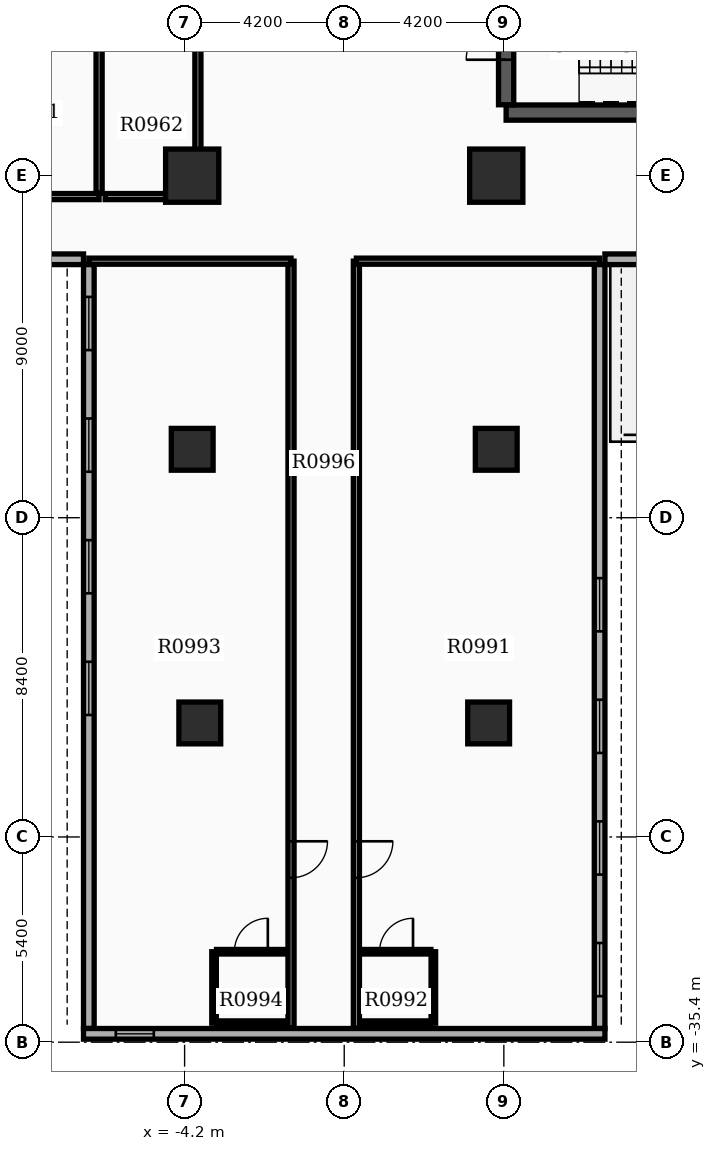
"""IFC4 building model, lengths in metres.
Left out: names, types, materials, properties, quantities, classifications, styles, units other than length and angle.
Written with IfcOpenShell. Run it as: python <this file> out.ifc"""

import sys

from ifc_helpers import new_model, si_unit, direction, frame, frame_2d, origin, origin_2d, place, context, subcontext, project, spatial, rectangle, extrude, element, fill, save


model = new_model("IFC4")
c1 = context("Model", 3, precision=1e-05, world=origin(), true_north=direction((0.0, 1.0)))
c2 = subcontext(c1, "Body", "Model", "MODEL_VIEW")
j1 = project(units=[si_unit("LENGTHUNIT", "METRE"), si_unit("PLANEANGLEUNIT", "RADIAN")], contexts=[c1])
p1 = place(None, origin())
s1 = spatial("IfcSite", under=j1, at=p1, CompositionType="ELEMENT")
p2 = place(p1, origin())
s2 = spatial("IfcBuilding", under=s1, at=p2, CompositionType="ELEMENT")
p3 = place(p2, frame((0.0, 0.0, 63.9)))
s3 = spatial("IfcBuildingStorey", under=s2, at=p3, CompositionType="ELEMENT", Elevation=63.9)
p4 = place(p3, frame((4.26, -10.94, 0.0), z_axis=(0.0, 0.0, 1.0), x_axis=(1.0, 0.0, 0.0)))
e1 = element("IfcWall", 1, at=p4, inside=s3, PredefinedType="SHEAR", context=c2, shape_type="SweptSolid", body=[
    extrude(rectangle(XDim=7.96, YDim=0.4, at=frame_2d((3.98, 0.0))), origin(), (0.0, 0.0, 1.0), 3.7),
])
p5 = place(p3, frame((4.26, -10.735, 0.0), z_axis=(0.0, 0.0, 1.0), x_axis=(0.0, 1.0, 0.0)))
e2 = element("IfcWall", 2, at=p5, inside=s3, PredefinedType="SHEAR", context=c2, shape_type="SweptSolid", body=[
    extrude(rectangle(XDim=3.43, YDim=0.4, at=frame_2d((1.715, 0.0))), origin(), (0.0, 0.0, 1.0), 3.7),
])
p6 = place(p5, frame((1.185, 0.0, 0.0)))
e3 = element("IfcOpeningElement", 3, at=p6, cuts=e2, PredefinedType="OPENING", context=c2, shape_type="SweptSolid", body=[
    extrude(rectangle(XDim=1.05, YDim=2.15, at=frame_2d((0.525, 1.075))), frame((0.0, 0.21, 0.0), z_axis=(0.0, -1.0, 0.0), x_axis=(1.0, 0.0, 0.0)), (0.0, 0.0, 1.0), 0.42),
])
for number, where, z_axis, x_axis in (
    (4, (-4.0, -12.6, 0.0), (0.0, 0.0, 1.0), (1.0, 0.0, 0.0)),
    (5, (4.0, -12.6, 0.0), (0.0, 0.0, 1.0), (1.0, 0.0, 0.0)),
):
    element("IfcColumn", number, at=place(p3, frame(where, z_axis=z_axis, x_axis=x_axis)), inside=s3, PredefinedType="COLUMN", context=c2, shape_type="SweptSolid", body=[
        extrude(rectangle(XDim=1.4, YDim=1.4, at=origin_2d()), origin(), (0.0, 0.0, 1.0), 3.9),
    ])
for number, where, z_axis, x_axis in (
    (6, (-4.0, -19.8, 0.0), (0.0, 0.0, 1.0), (1.0, 0.0, 0.0)),
    (7, (4.0, -19.8, 0.0), (0.0, 0.0, 1.0), (1.0, 0.0, 0.0)),
    (8, (-3.8, -27.0, 0.0), (0.0, 0.0, 1.0), (1.0, 0.0, 0.0)),
    (9, (3.8, -27.0, 0.0), (0.0, 0.0, 1.0), (1.0, 0.0, 0.0)),
):
    element("IfcColumn", number, at=place(p3, frame(where, z_axis=z_axis, x_axis=x_axis)), inside=s3, PredefinedType="COLUMN", context=c2, shape_type="SweptSolid", body=[
        extrude(rectangle(XDim=1.1, YDim=1.1, at=origin_2d()), origin(), (0.0, 0.0, 1.0), 3.9),
    ])
p7 = place(p3, frame((-6.72, -14.94, 0.0), z_axis=(0.0, 0.0, 1.0), x_axis=(0.0, -1.0, 0.0)))
e10 = element("IfcWall", 10, at=p7, inside=s3, PredefinedType="STANDARD", context=c2, shape_type="SweptSolid", body=[
    extrude(rectangle(XDim=20.1, YDim=0.28, at=frame_2d((10.05, 0.0))), origin(), (0.0, 0.0, 1.0), 2.91),
])
p8 = place(p7, frame((0.85, 0.0, 0.8)))
e11 = element("IfcOpeningElement", 11, at=p8, cuts=e10, PredefinedType="OPENING", context=c2, shape_type="SweptSolid", body=[
    extrude(rectangle(XDim=1.4, YDim=1.6, at=frame_2d((0.7, 0.8))), frame((0.0, 0.15, 0.0), z_axis=(0.0, -1.0, 0.0), x_axis=(1.0, 0.0, 0.0)), (0.0, 0.0, 1.0), 0.3),
])
p9 = place(p7, frame((4.05, 0.0, 0.8)))
e12 = element("IfcOpeningElement", 12, at=p9, cuts=e10, PredefinedType="OPENING", context=c2, shape_type="SweptSolid", body=[
    extrude(rectangle(XDim=1.4, YDim=1.6, at=frame_2d((0.7, 0.8))), frame((0.0, 0.15, 0.0), z_axis=(0.0, -1.0, 0.0), x_axis=(1.0, 0.0, 0.0)), (0.0, 0.0, 1.0), 0.3),
])
p10 = place(p7, frame((7.25, 0.0, 0.8)))
e13 = element("IfcOpeningElement", 13, at=p10, cuts=e10, PredefinedType="OPENING", context=c2, shape_type="SweptSolid", body=[
    extrude(rectangle(XDim=1.4, YDim=1.6, at=frame_2d((0.7, 0.8))), frame((0.0, 0.15, 0.0), z_axis=(0.0, -1.0, 0.0), x_axis=(1.0, 0.0, 0.0)), (0.0, 0.0, 1.0), 0.3),
])
p11 = place(p7, frame((10.45, 0.0, 0.8)))
e14 = element("IfcOpeningElement", 14, at=p11, cuts=e10, PredefinedType="OPENING", context=c2, shape_type="SweptSolid", body=[
    extrude(rectangle(XDim=1.4, YDim=1.6, at=frame_2d((0.7, 0.8))), frame((0.0, 0.15, 0.0), z_axis=(0.0, -1.0, 0.0), x_axis=(1.0, 0.0, 0.0)), (0.0, 0.0, 1.0), 0.3),
])
p12 = place(p3, frame((6.72, -35.04, 0.0), z_axis=(0.0, 0.0, 1.0), x_axis=(0.0, 1.0, 0.0)))
e15 = element("IfcWall", 15, at=p12, inside=s3, PredefinedType="STANDARD", context=c2, shape_type="SweptSolid", body=[
    extrude(rectangle(XDim=20.1, YDim=0.28, at=frame_2d((10.05, 0.0))), origin(), (0.0, 0.0, 1.0), 2.91),
])
p13 = place(p12, frame((0.85, 0.0, 0.8)))
e16 = element("IfcOpeningElement", 16, at=p13, cuts=e15, PredefinedType="OPENING", context=c2, shape_type="SweptSolid", body=[
    extrude(rectangle(XDim=1.4, YDim=1.6, at=frame_2d((0.7, 0.8))), frame((0.0, 0.15, 0.0), z_axis=(0.0, -1.0, 0.0), x_axis=(1.0, 0.0, 0.0)), (0.0, 0.0, 1.0), 0.3),
])
p14 = place(p12, frame((4.05, 0.0, 0.8)))
e17 = element("IfcOpeningElement", 17, at=p14, cuts=e15, PredefinedType="OPENING", context=c2, shape_type="SweptSolid", body=[
    extrude(rectangle(XDim=1.4, YDim=1.6, at=frame_2d((0.7, 0.8))), frame((0.0, 0.15, 0.0), z_axis=(0.0, -1.0, 0.0), x_axis=(1.0, 0.0, 0.0)), (0.0, 0.0, 1.0), 0.3),
])
p15 = place(p12, frame((7.25, 0.0, 0.8)))
e18 = element("IfcOpeningElement", 18, at=p15, cuts=e15, PredefinedType="OPENING", context=c2, shape_type="SweptSolid", body=[
    extrude(rectangle(XDim=1.4, YDim=1.6, at=frame_2d((0.7, 0.8))), frame((0.0, 0.15, 0.0), z_axis=(0.0, -1.0, 0.0), x_axis=(1.0, 0.0, 0.0)), (0.0, 0.0, 1.0), 0.3),
])
p16 = place(p12, frame((10.45, 0.0, 0.8)))
e19 = element("IfcOpeningElement", 19, at=p16, cuts=e15, PredefinedType="OPENING", context=c2, shape_type="SweptSolid", body=[
    extrude(rectangle(XDim=1.4, YDim=1.6, at=frame_2d((0.7, 0.8))), frame((0.0, 0.15, 0.0), z_axis=(0.0, -1.0, 0.0), x_axis=(1.0, 0.0, 0.0)), (0.0, 0.0, 1.0), 0.3),
])
p17 = place(p3, frame((-6.86, -35.18, 0.0), z_axis=(0.0, 0.0, 1.0), x_axis=(1.0, 0.0, 0.0)))
e20 = element("IfcWall", 20, at=p17, inside=s3, PredefinedType="STANDARD", context=c2, shape_type="SweptSolid", body=[
    extrude(rectangle(XDim=13.72, YDim=0.28, at=frame_2d((6.86, 0.0))), origin(), (0.0, 0.0, 1.0), 2.91),
])
p18 = place(p17, frame((0.85, 0.0, 0.85)))
e21 = element("IfcOpeningElement", 21, at=p18, cuts=e20, PredefinedType="OPENING", context=c2, shape_type="SweptSolid", body=[
    extrude(rectangle(XDim=1.0, YDim=1.5, at=frame_2d((0.5, 0.75))), frame((0.0, 0.15, 0.0), z_axis=(0.0, -1.0, 0.0), x_axis=(1.0, 0.0, 0.0)), (0.0, 0.0, 1.0), 0.3),
])
for number, where, z_axis, x_axis in (
    (22, (-13.16, -14.8, 0.0), (0.0, 0.0, 1.0), (1.0, 0.0, 0.0)),
    (23, (13.16, -14.8, 0.0), (0.0, 0.0, 1.0), (-1.0, 0.0, 0.0)),
):
    element("IfcWall", number, at=place(p3, frame(where, z_axis=z_axis, x_axis=x_axis)), inside=s3, PredefinedType="STANDARD", context=c2, shape_type="SweptSolid", body=[
        extrude(rectangle(XDim=6.3, YDim=0.28, at=frame_2d((3.15, 0.0))), origin(), (0.0, 0.0, 1.0), 2.91),
    ])
p19 = place(p3, frame((-12.4, -13.15, 0.0), z_axis=(0.0, 0.0, 1.0), x_axis=(1.0, 0.0, 0.0)))
e24 = element("IfcWall", 24, at=p19, inside=s3, PredefinedType="PARTITIONING", context=c2, shape_type="SweptSolid", body=[
    extrude(rectangle(XDim=5.95, YDim=0.16, at=frame_2d((2.975, 0.0))), origin(), (0.0, 0.0, 1.0), 2.9),
])
p20 = place(p3, frame((-6.45, -13.065, 0.0), z_axis=(0.0, 0.0, 1.0), x_axis=(0.0, 1.0, 0.0)))
e25 = element("IfcWall", 25, at=p20, inside=s3, PredefinedType="PARTITIONING", context=c2, shape_type="SweptSolid", body=[
    extrude(rectangle(XDim=4.23, YDim=0.16, at=frame_2d((2.115, 0.0))), origin(), (0.0, 0.0, 1.0), 2.9),
])
p21 = place(p3, frame((-6.29, -13.15, 0.0), z_axis=(0.0, 0.0, 1.0), x_axis=(1.0, 0.0, 0.0)))
e26 = element("IfcWall", 26, at=p21, inside=s3, PredefinedType="PARTITIONING", context=c2, shape_type="SweptSolid", body=[
    extrude(rectangle(XDim=2.44, YDim=0.16, at=frame_2d((1.22, 0.0))), origin(), (0.0, 0.0, 1.0), 2.9),
])
p22 = place(p3, frame((-3.85, -13.065, 0.0), z_axis=(0.0, 0.0, 1.0), x_axis=(0.0, 1.0, 0.0)))
e27 = element("IfcWall", 27, at=p22, inside=s3, PredefinedType="PARTITIONING", context=c2, shape_type="SweptSolid", body=[
    extrude(rectangle(XDim=4.23, YDim=0.16, at=frame_2d((2.115, 0.0))), origin(), (0.0, 0.0, 1.0), 2.9),
])
p23 = place(p3, frame((0.32, -14.85, 0.0), z_axis=(0.0, 0.0, 1.0), x_axis=(0.0, -1.0, 0.0)))
e28 = element("IfcWall", 28, at=p23, inside=s3, PredefinedType="PARTITIONING", context=c2, shape_type="SweptSolid", body=[
    extrude(rectangle(XDim=20.182, YDim=0.16, at=frame_2d((10.091, 0.0))), origin(), (0.0, 0.0, 1.0), 2.9),
])
p24 = place(p23, frame((15.264, 0.0, 0.0)))
e29 = element("IfcOpeningElement", 29, at=p24, cuts=e28, PredefinedType="OPENING", context=c2, shape_type="SweptSolid", body=[
    extrude(rectangle(XDim=0.96, YDim=2.15, at=frame_2d((0.48, 1.075))), frame((0.0, 0.09, 0.0), z_axis=(0.0, -1.0, 0.0), x_axis=(1.0, 0.0, 0.0)), (0.0, 0.0, 1.0), 0.18),
])
p25 = place(p3, frame((0.32, -14.85, 0.0), z_axis=(0.0, 0.0, 1.0), x_axis=(1.0, 0.0, 0.0)))
e30 = element("IfcWall", 30, at=p25, inside=s3, PredefinedType="PARTITIONING", context=c2, shape_type="SweptSolid", body=[
    extrude(rectangle(XDim=6.4, YDim=0.16, at=frame_2d((3.2, 0.0))), origin(), (0.0, 0.0, 1.0), 2.9),
])
p26 = place(p3, frame((0.46, -33.02, 0.0), z_axis=(0.0, 0.0, 1.0), x_axis=(1.0, 0.0, 0.0)))
e31 = element("IfcWall", 31, at=p26, inside=s3, PredefinedType="PARTITIONING", context=c2, shape_type="SweptSolid", body=[
    extrude(rectangle(XDim=1.82, YDim=0.12, at=frame_2d((0.91, 0.0))), origin(), (0.0, 0.0, 1.0), 2.9),
])
p27 = place(p26, frame((0.47, 0.0, 0.0)))
e32 = element("IfcOpeningElement", 32, at=p27, cuts=e31, PredefinedType="OPENING", context=c2, shape_type="SweptSolid", body=[
    extrude(rectangle(XDim=0.88, YDim=2.1, at=frame_2d((0.44, 1.05))), frame((0.0, 0.07, 0.0), z_axis=(0.0, -1.0, 0.0), x_axis=(1.0, 0.0, 0.0)), (0.0, 0.0, 1.0), 0.14),
])
p28 = place(p3, frame((0.46, -34.9, 0.0), z_axis=(0.0, 0.0, 1.0), x_axis=(1.0, 0.0, 0.0)))
e33 = element("IfcWall", 33, at=p28, inside=s3, PredefinedType="PARTITIONING", context=c2, shape_type="SweptSolid", body=[
    extrude(rectangle(XDim=1.82, YDim=0.12, at=frame_2d((0.91, 0.0))), origin(), (0.0, 0.0, 1.0), 2.9),
])
p29 = place(p3, frame((2.345, -33.02, 0.0), z_axis=(0.0, 0.0, 1.0), x_axis=(0.0, -1.0, 0.0)))
e34 = element("IfcWall", 34, at=p29, inside=s3, PredefinedType="PARTITIONING", context=c2, shape_type="SweptSolid", body=[
    extrude(rectangle(XDim=1.88, YDim=0.12, at=frame_2d((0.94, 0.0))), origin(), (0.0, 0.0, 1.0), 2.9),
])
p30 = place(p3, frame((-1.4, -14.85, 0.0), z_axis=(0.0, 0.0, 1.0), x_axis=(0.0, -1.0, 0.0)))
e35 = element("IfcWall", 35, at=p30, inside=s3, PredefinedType="PARTITIONING", context=c2, shape_type="SweptSolid", body=[
    extrude(rectangle(XDim=20.182, YDim=0.16, at=frame_2d((10.091, 0.0))), origin(), (0.0, 0.0, 1.0), 2.9),
])
p31 = place(p30, frame((15.264, 0.0, 0.0)))
e36 = element("IfcOpeningElement", 36, at=p31, cuts=e35, PredefinedType="OPENING", context=c2, shape_type="SweptSolid", body=[
    extrude(rectangle(XDim=0.96, YDim=2.15, at=frame_2d((0.48, 1.075))), frame((0.0, 0.09, 0.0), z_axis=(0.0, -1.0, 0.0), x_axis=(1.0, 0.0, 0.0)), (0.0, 0.0, 1.0), 0.18),
])
p32 = place(p3, frame((-1.4, -14.85, 0.0), z_axis=(0.0, 0.0, 1.0), x_axis=(-1.0, 0.0, 0.0)))
e37 = element("IfcWall", 37, at=p32, inside=s3, PredefinedType="PARTITIONING", context=c2, shape_type="SweptSolid", body=[
    extrude(rectangle(XDim=5.32, YDim=0.16, at=frame_2d((2.66, 0.0))), origin(), (0.0, 0.0, 1.0), 2.9),
])
p33 = place(p3, frame((-3.36, -33.02, 0.0), z_axis=(0.0, 0.0, 1.0), x_axis=(1.0, 0.0, 0.0)))
e38 = element("IfcWall", 38, at=p33, inside=s3, PredefinedType="PARTITIONING", context=c2, shape_type="SweptSolid", body=[
    extrude(rectangle(XDim=1.82, YDim=0.12, at=frame_2d((0.91, 0.0))), origin(), (0.0, 0.0, 1.0), 2.9),
])
p34 = place(p33, frame((0.47, 0.0, 0.0)))
e39 = element("IfcOpeningElement", 39, at=p34, cuts=e38, PredefinedType="OPENING", context=c2, shape_type="SweptSolid", body=[
    extrude(rectangle(XDim=0.88, YDim=2.1, at=frame_2d((0.44, 1.05))), frame((0.0, 0.07, 0.0), z_axis=(0.0, -1.0, 0.0), x_axis=(1.0, 0.0, 0.0)), (0.0, 0.0, 1.0), 0.14),
])
p35 = place(p3, frame((-3.36, -34.9, 0.0), z_axis=(0.0, 0.0, 1.0), x_axis=(1.0, 0.0, 0.0)))
e40 = element("IfcWall", 40, at=p35, inside=s3, PredefinedType="PARTITIONING", context=c2, shape_type="SweptSolid", body=[
    extrude(rectangle(XDim=1.82, YDim=0.12, at=frame_2d((0.91, 0.0))), origin(), (0.0, 0.0, 1.0), 2.9),
])
p36 = place(p3, frame((-3.425, -33.02, 0.0), z_axis=(0.0, 0.0, 1.0), x_axis=(0.0, -1.0, 0.0)))
e41 = element("IfcWall", 41, at=p36, inside=s3, PredefinedType="PARTITIONING", context=c2, shape_type="SweptSolid", body=[
    extrude(rectangle(XDim=1.88, YDim=0.12, at=frame_2d((0.94, 0.0))), origin(), (0.0, 0.0, 1.0), 2.9),
])
p37 = place(p8, origin())
e42 = element("IfcWindow", 42, at=p37, inside=s3, PartitioningType="SINGLE_PANEL", PredefinedType="WINDOW", context=c2, shape_type="SweptSolid", body=[
    extrude(rectangle(XDim=1.4, YDim=1.6, at=frame_2d((0.7, 0.8))), frame((0.0, 0.03, 0.0), z_axis=(0.0, -1.0, 0.0), x_axis=(1.0, 0.0, 0.0)), (0.0, 0.0, 1.0), 0.06),
])
fill(e11, e42)
p38 = place(p9, origin())
e43 = element("IfcWindow", 43, at=p38, inside=s3, PartitioningType="SINGLE_PANEL", PredefinedType="WINDOW", context=c2, shape_type="SweptSolid", body=[
    extrude(rectangle(XDim=1.4, YDim=1.6, at=frame_2d((0.7, 0.8))), frame((0.0, 0.03, 0.0), z_axis=(0.0, -1.0, 0.0), x_axis=(1.0, 0.0, 0.0)), (0.0, 0.0, 1.0), 0.06),
])
fill(e12, e43)
p39 = place(p10, origin())
e44 = element("IfcWindow", 44, at=p39, inside=s3, PartitioningType="SINGLE_PANEL", PredefinedType="WINDOW", context=c2, shape_type="SweptSolid", body=[
    extrude(rectangle(XDim=1.4, YDim=1.6, at=frame_2d((0.7, 0.8))), frame((0.0, 0.03, 0.0), z_axis=(0.0, -1.0, 0.0), x_axis=(1.0, 0.0, 0.0)), (0.0, 0.0, 1.0), 0.06),
])
fill(e13, e44)
p40 = place(p11, origin())
e45 = element("IfcWindow", 45, at=p40, inside=s3, PartitioningType="SINGLE_PANEL", PredefinedType="WINDOW", context=c2, shape_type="SweptSolid", body=[
    extrude(rectangle(XDim=1.4, YDim=1.6, at=frame_2d((0.7, 0.8))), frame((0.0, 0.03, 0.0), z_axis=(0.0, -1.0, 0.0), x_axis=(1.0, 0.0, 0.0)), (0.0, 0.0, 1.0), 0.06),
])
fill(e14, e45)
p41 = place(p13, origin())
e46 = element("IfcWindow", 46, at=p41, inside=s3, PartitioningType="SINGLE_PANEL", PredefinedType="WINDOW", context=c2, shape_type="SweptSolid", body=[
    extrude(rectangle(XDim=1.4, YDim=1.6, at=frame_2d((0.7, 0.8))), frame((0.0, 0.03, 0.0), z_axis=(0.0, -1.0, 0.0), x_axis=(1.0, 0.0, 0.0)), (0.0, 0.0, 1.0), 0.06),
])
fill(e16, e46)
p42 = place(p14, origin())
e47 = element("IfcWindow", 47, at=p42, inside=s3, PartitioningType="SINGLE_PANEL", PredefinedType="WINDOW", context=c2, shape_type="SweptSolid", body=[
    extrude(rectangle(XDim=1.4, YDim=1.6, at=frame_2d((0.7, 0.8))), frame((0.0, 0.03, 0.0), z_axis=(0.0, -1.0, 0.0), x_axis=(1.0, 0.0, 0.0)), (0.0, 0.0, 1.0), 0.06),
])
fill(e17, e47)
p43 = place(p15, origin())
e48 = element("IfcWindow", 48, at=p43, inside=s3, PartitioningType="SINGLE_PANEL", PredefinedType="WINDOW", context=c2, shape_type="SweptSolid", body=[
    extrude(rectangle(XDim=1.4, YDim=1.6, at=frame_2d((0.7, 0.8))), frame((0.0, 0.03, 0.0), z_axis=(0.0, -1.0, 0.0), x_axis=(1.0, 0.0, 0.0)), (0.0, 0.0, 1.0), 0.06),
])
fill(e18, e48)
p44 = place(p16, origin())
e49 = element("IfcWindow", 49, at=p44, inside=s3, PartitioningType="SINGLE_PANEL", PredefinedType="WINDOW", context=c2, shape_type="SweptSolid", body=[
    extrude(rectangle(XDim=1.4, YDim=1.6, at=frame_2d((0.7, 0.8))), frame((0.0, 0.03, 0.0), z_axis=(0.0, -1.0, 0.0), x_axis=(1.0, 0.0, 0.0)), (0.0, 0.0, 1.0), 0.06),
])
fill(e19, e49)
p45 = place(p18, origin())
e50 = element("IfcWindow", 50, at=p45, inside=s3, PartitioningType="SINGLE_PANEL", PredefinedType="WINDOW", context=c2, shape_type="SweptSolid", body=[
    extrude(rectangle(XDim=1.0, YDim=1.5, at=frame_2d((0.5, 0.75))), frame((0.0, 0.03, 0.0), z_axis=(0.0, -1.0, 0.0), x_axis=(1.0, 0.0, 0.0)), (0.0, 0.0, 1.0), 0.06),
])
fill(e21, e50)
p46 = place(p6, origin())
e51 = element("IfcDoor", 51, at=p46, inside=s3, OperationType="SINGLE_SWING_LEFT", PredefinedType="DOOR", context=c2, shape_type="SweptSolid", body=[
    extrude(rectangle(XDim=1.05, YDim=2.15, at=frame_2d((0.525, 1.075))), frame((0.0, 0.025, 0.0), z_axis=(0.0, -1.0, 0.0), x_axis=(1.0, 0.0, 0.0)), (0.0, 0.0, 1.0), 0.05),
])
fill(e3, e51)
p47 = place(p24, origin())
e52 = element("IfcDoor", 52, at=p47, inside=s3, OperationType="SINGLE_SWING_LEFT", PredefinedType="DOOR", context=c2, shape_type="SweptSolid", body=[
    extrude(rectangle(XDim=0.96, YDim=2.15, at=frame_2d((0.48, 1.075))), frame((0.0, 0.025, 0.0), z_axis=(0.0, -1.0, 0.0), x_axis=(1.0, 0.0, 0.0)), (0.0, 0.0, 1.0), 0.05),
])
fill(e29, e52)
p48 = place(p27, origin())
e53 = element("IfcDoor", 53, at=p48, inside=s3, OperationType="SINGLE_SWING_RIGHT", PredefinedType="DOOR", context=c2, shape_type="SweptSolid", body=[
    extrude(rectangle(XDim=0.88, YDim=2.1, at=frame_2d((0.44, 1.05))), frame((0.0, 0.025, 0.0), z_axis=(0.0, -1.0, 0.0), x_axis=(1.0, 0.0, 0.0)), (0.0, 0.0, 1.0), 0.05),
])
fill(e32, e53)
p49 = place(p31, origin())
e54 = element("IfcDoor", 54, at=p49, inside=s3, OperationType="SINGLE_SWING_LEFT", PredefinedType="DOOR", context=c2, shape_type="SweptSolid", body=[
    extrude(rectangle(XDim=0.96, YDim=2.15, at=frame_2d((0.48, 1.075))), frame((0.0, 0.025, 0.0), z_axis=(0.0, -1.0, 0.0), x_axis=(1.0, 0.0, 0.0)), (0.0, 0.0, 1.0), 0.05),
])
fill(e36, e54)
p50 = place(p34, origin())
e55 = element("IfcDoor", 55, at=p50, inside=s3, OperationType="SINGLE_SWING_RIGHT", PredefinedType="DOOR", context=c2, shape_type="SweptSolid", body=[
    extrude(rectangle(XDim=0.88, YDim=2.1, at=frame_2d((0.44, 1.05))), frame((0.0, 0.025, 0.0), z_axis=(0.0, -1.0, 0.0), x_axis=(1.0, 0.0, 0.0)), (0.0, 0.0, 1.0), 0.05),
])
fill(e39, e55)
save(model, sys.argv[1])
